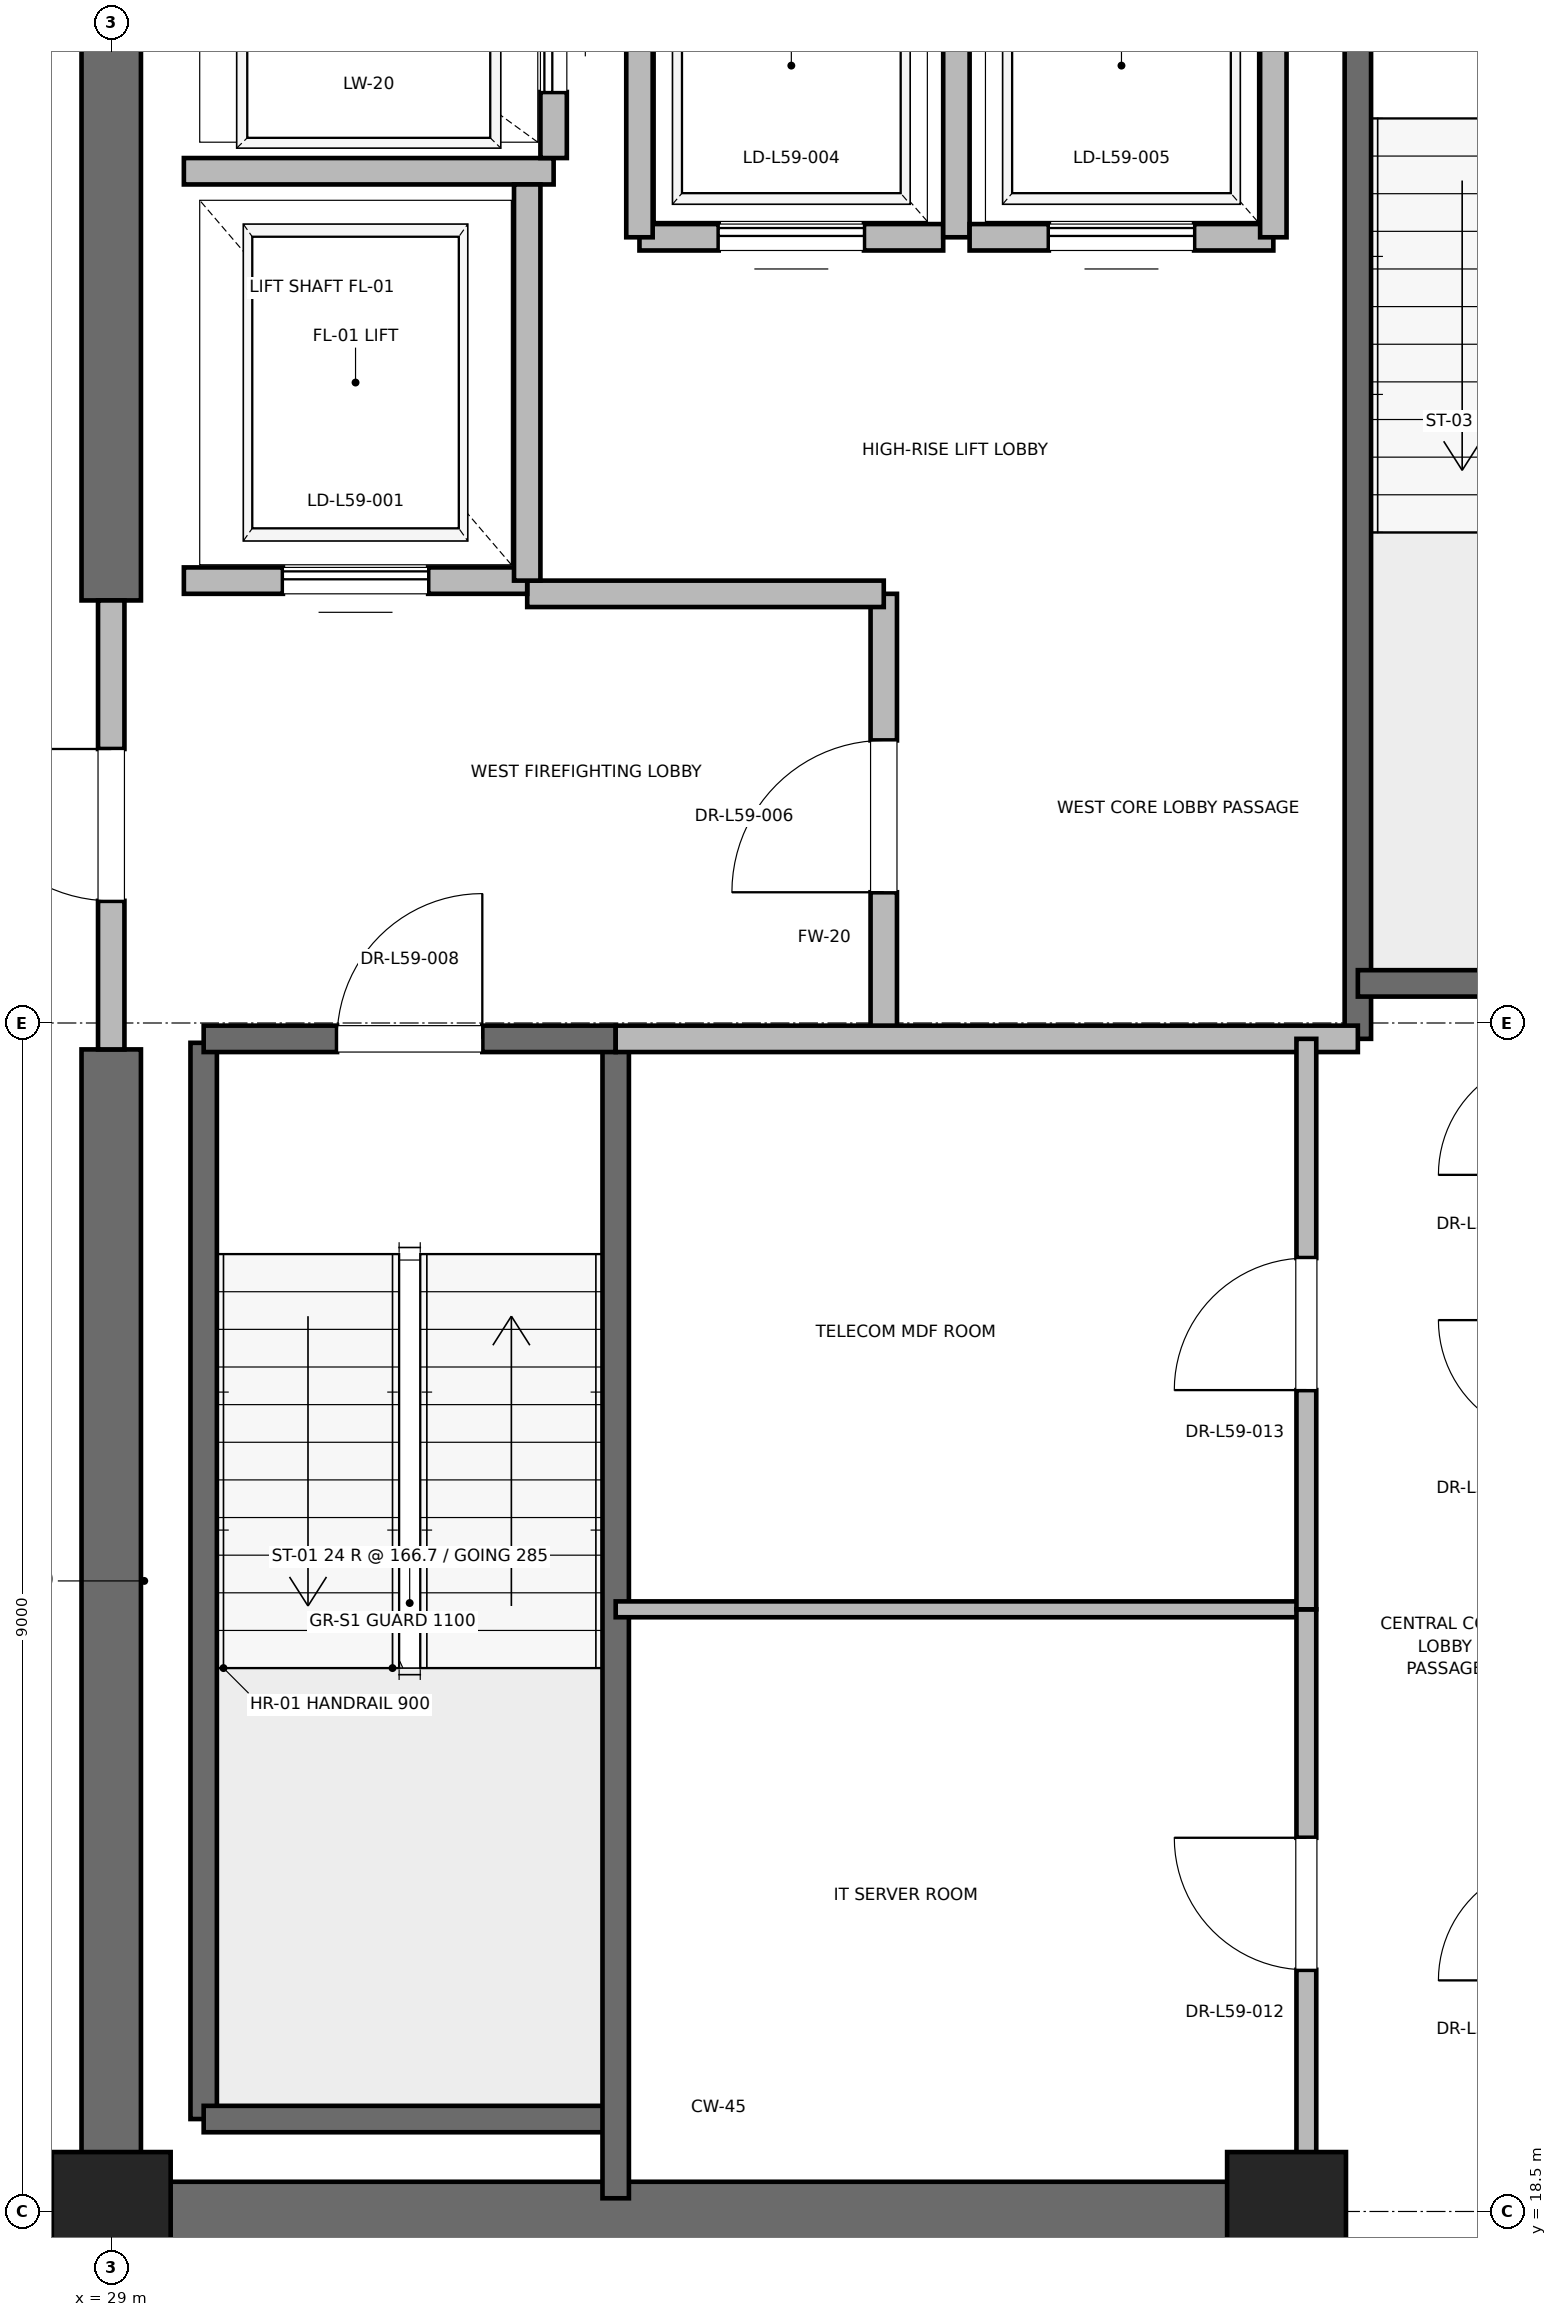
"""IFC4 building model, lengths in metres.
Left out: names, types, materials, properties, quantities, classifications, styles, units other than length and angle.
Written with IfcOpenShell. Run it as: python <this file> out.ifc"""

import sys

from ifc_helpers import new_model, si_unit, direction, frame, frame_2d, origin, origin_2d, place, context, subcontext, project, spatial, rectangle, extrude, element, fill, save


model = new_model("IFC4")
c1 = context("Model", 3, precision=1e-05, world=origin(), true_north=direction((0.0, 1.0)))
c2 = subcontext(c1, "Body", "Model", "MODEL_VIEW")
j1 = project(units=[si_unit("LENGTHUNIT", "METRE"), si_unit("PLANEANGLEUNIT", "RADIAN")], contexts=[c1])
p1 = place(None, origin())
s1 = spatial("IfcSite", under=j1, at=p1, CompositionType="ELEMENT")
p2 = place(p1, origin())
s2 = spatial("IfcBuilding", under=s1, at=p2, CompositionType="ELEMENT")
p3 = place(p2, frame((0.0, 0.0, 255.2)))
s3 = spatial("IfcBuildingStorey", under=s2, at=p3, CompositionType="ELEMENT", Elevation=255.2)
for number, where, z_axis, x_axis in (
    (1, (29.0, 18.5, 0.0), (0.0, 0.0, 1.0), (1.0, 0.0, 0.0)),
    (2, (37.9, 18.5, 0.0), (0.0, 0.0, 1.0), (1.0, 0.0, 0.0)),
):
    element("IfcColumn", number, at=place(p3, frame(where, z_axis=z_axis, x_axis=x_axis)), inside=s3, PredefinedType="PILASTER", context=c2, shape_type="SweptSolid", body=[
        extrude(rectangle(XDim=0.9, YDim=0.9, at=origin_2d()), origin(), (0.0, 0.0, 1.0), 4.0),
    ])
p4 = place(p3, frame((29.0, 18.5, 0.0), z_axis=(0.0, 0.0, 1.0), x_axis=(1.0, 0.0, 0.0)))
e3 = element("IfcWall", 3, at=p4, inside=s3, PredefinedType="SHEAR", context=c2, shape_type="SweptSolid", body=[
    extrude(rectangle(XDim=9.2, YDim=0.45, at=frame_2d((4.6, 0.0))), origin(), (0.0, 0.0, 1.0), 3.785),
])
p5 = place(p3, frame((29.0, 18.5, 0.0), z_axis=(0.0, 0.0, 1.0), x_axis=(0.0, 1.0, 0.0)))
e4 = element("IfcWall", 4, at=p5, inside=s3, PredefinedType="SHEAR", context=c2, shape_type="SweptSolid", body=[
    extrude(rectangle(XDim=8.8, YDim=0.45, at=frame_2d((4.4, 0.0))), origin(), (0.0, 0.0, 1.0), 3.785),
])
p6 = place(p3, frame((29.0, 30.7, 0.0), z_axis=(0.0, 0.0, 1.0), x_axis=(0.0, 1.0, 0.0)))
e5 = element("IfcWall", 5, at=p6, inside=s3, PredefinedType="SHEAR", context=c2, shape_type="SweptSolid", body=[
    extrude(rectangle(XDim=5.8, YDim=0.45, at=frame_2d((2.9, 0.0))), origin(), (0.0, 0.0, 1.0), 3.785),
])
p7 = place(p3, frame((29.7, 19.2, 0.0), z_axis=(0.0, 0.0, 1.0), x_axis=(0.0, 1.0, 0.0)))
e6 = element("IfcWall", 6, at=p7, inside=s3, PredefinedType="SOLIDWALL", context=c2, shape_type="SweptSolid", body=[
    extrude(rectangle(XDim=8.15, YDim=0.2, at=frame_2d((4.075, 0.0))), origin(), (0.0, 0.0, 1.0), 3.785),
])
p8 = place(p3, frame((29.7, 19.2, 0.0), z_axis=(0.0, 0.0, 1.0), x_axis=(1.0, 0.0, 0.0)))
e7 = element("IfcWall", 7, at=p8, inside=s3, PredefinedType="SOLIDWALL", context=c2, shape_type="SweptSolid", body=[
    extrude(rectangle(XDim=3.12, YDim=0.2, at=frame_2d((1.56, 0.0))), origin(), (0.0, 0.0, 1.0), 3.785),
])
p9 = place(p3, frame((32.82, 18.6, 0.0), z_axis=(0.0, 0.0, 1.0), x_axis=(0.0, 1.0, 0.0)))
e8 = element("IfcWall", 8, at=p9, inside=s3, PredefinedType="SOLIDWALL", context=c2, shape_type="SweptSolid", body=[
    extrude(rectangle(XDim=8.78, YDim=0.2, at=frame_2d((4.39, 0.0))), origin(), (0.0, 0.0, 1.0), 3.785),
])
p10 = place(p3, frame((29.7, 27.38, 0.0), z_axis=(0.0, 0.0, 1.0), x_axis=(1.0, 0.0, 0.0)))
e9 = element("IfcWall", 9, at=p10, inside=s3, PredefinedType="SOLIDWALL", context=c2, shape_type="SweptSolid", body=[
    extrude(rectangle(XDim=3.12, YDim=0.2, at=frame_2d((1.56, 0.0))), origin(), (0.0, 0.0, 1.0), 3.785),
])
p11 = place(p10, frame((1.01, 0.0, 0.0)))
e10 = element("IfcOpeningElement", 10, at=p11, cuts=e9, PredefinedType="OPENING", context=c2, shape_type="SweptSolid", body=[
    extrude(rectangle(XDim=1.1, YDim=2.15, at=frame_2d((0.55, 1.075))), frame((0.0, 0.1, 0.0), z_axis=(0.0, -1.0, 0.0), x_axis=(1.0, 0.0, 0.0)), (0.0, 0.0, 1.0), 0.2),
])
p12 = place(p3, frame((38.44, 27.38, 0.0), z_axis=(0.0, 0.0, 1.0), x_axis=(0.0, 1.0, 0.0)))
e11 = element("IfcWall", 11, at=p12, inside=s3, PredefinedType="SOLIDWALL", context=c2, shape_type="SweptSolid", body=[
    extrude(rectangle(XDim=8.87, YDim=0.2, at=frame_2d((4.435, 0.0))), origin(), (0.0, 0.0, 1.0), 3.785),
])
p13 = place(p3, frame((38.44, 27.8, 0.0), z_axis=(0.0, 0.0, 1.0), x_axis=(1.0, 0.0, 0.0)))
e12 = element("IfcWall", 12, at=p13, inside=s3, PredefinedType="SOLIDWALL", context=c2, shape_type="SweptSolid", body=[
    extrude(rectangle(XDim=3.32, YDim=0.2, at=frame_2d((1.66, 0.0))), origin(), (0.0, 0.0, 1.0), 3.785),
])
p14 = place(p3, frame((34.85, 27.38, 0.0), z_axis=(0.0, 0.0, 1.0), x_axis=(0.0, 1.0, 0.0)))
e13 = element("IfcWall", 13, at=p14, inside=s3, PredefinedType="PARTITIONING", context=c2, shape_type="SweptSolid", body=[
    extrude(rectangle(XDim=3.37, YDim=0.2, at=frame_2d((1.685, 0.0))), origin(), (0.0, 0.0, 1.0), 3.785),
])
p15 = place(p14, frame((1.11, 0.0, 0.0)))
e14 = element("IfcOpeningElement", 14, at=p15, cuts=e13, PredefinedType="OPENING", context=c2, shape_type="SweptSolid", body=[
    extrude(rectangle(XDim=1.15, YDim=2.2, at=frame_2d((0.575, 1.1))), frame((0.0, 0.1, 0.0), z_axis=(0.0, -1.0, 0.0), x_axis=(1.0, 0.0, 0.0)), (0.0, 0.0, 1.0), 0.2),
])
p16 = place(p3, frame((29.0, 27.3, 0.0), z_axis=(0.0, 0.0, 1.0), x_axis=(0.0, 1.0, 0.0)))
e15 = element("IfcWall", 15, at=p16, inside=s3, PredefinedType="PARTITIONING", context=c2, shape_type="SweptSolid", body=[
    extrude(rectangle(XDim=3.4, YDim=0.2, at=frame_2d((1.7, 0.0))), origin(), (0.0, 0.0, 1.0), 2.865),
])
p17 = place(p16, frame((1.125, 0.0, 0.0)))
e16 = element("IfcOpeningElement", 16, at=p17, cuts=e15, PredefinedType="OPENING", context=c2, shape_type="SweptSolid", body=[
    extrude(rectangle(XDim=1.15, YDim=2.2, at=frame_2d((0.575, 1.1))), frame((0.0, 0.1, 0.0), z_axis=(0.0, -1.0, 0.0), x_axis=(1.0, 0.0, 0.0)), (0.0, 0.0, 1.0), 0.2),
])
p18 = place(p3, frame((32.82, 27.38, 0.0), z_axis=(0.0, 0.0, 1.0), x_axis=(1.0, 0.0, 0.0)))
e17 = element("IfcWall", 17, at=p18, inside=s3, PredefinedType="PARTITIONING", context=c2, shape_type="SweptSolid", body=[
    extrude(rectangle(XDim=5.62, YDim=0.2, at=frame_2d((2.81, 0.0))), origin(), (0.0, 0.0, 1.0), 3.785),
])
p19 = place(p3, frame((32.15, 30.75, 0.0), z_axis=(0.0, 0.0, 1.0), x_axis=(1.0, 0.0, 0.0)))
e18 = element("IfcWall", 18, at=p19, inside=s3, PredefinedType="PARTITIONING", context=c2, shape_type="SweptSolid", body=[
    extrude(rectangle(XDim=2.7, YDim=0.2, at=frame_2d((1.35, 0.0))), origin(), (0.0, 0.0, 1.0), 3.785),
])
p20 = place(p3, frame((29.55, 30.85, 0.0), z_axis=(0.0, 0.0, 1.0), x_axis=(1.0, 0.0, 0.0)))
e19 = element("IfcWall", 19, at=p20, inside=s3, PredefinedType="SOLIDWALL", context=c2, shape_type="SweptSolid", body=[
    extrude(rectangle(XDim=2.6, YDim=0.2, at=frame_2d((1.3, 0.0))), origin(), (0.0, 0.0, 1.0), 2.865),
])
p21 = place(p20, frame((0.75, 0.0, 0.0)))
e20 = element("IfcOpeningElement", 20, at=p21, cuts=e19, PredefinedType="OPENING", context=c2, shape_type="SweptSolid", body=[
    extrude(rectangle(XDim=1.1, YDim=2.2, at=frame_2d((0.55, 1.1))), frame((0.0, 0.1, 0.0), z_axis=(0.0, -1.0, 0.0), x_axis=(1.0, 0.0, 0.0)), (0.0, 0.0, 1.0), 0.2),
])
p22 = place(p3, frame((29.55, 33.95, 0.0), z_axis=(0.0, 0.0, 1.0), x_axis=(1.0, 0.0, 0.0)))
e21 = element("IfcWall", 21, at=p22, inside=s3, PredefinedType="SOLIDWALL", context=c2, shape_type="SweptSolid", body=[
    extrude(rectangle(XDim=2.8, YDim=0.2, at=frame_2d((1.4, 0.0))), origin(), (0.0, 0.0, 1.0), 3.785),
])
p23 = place(p3, frame((32.15, 30.85, 0.0), z_axis=(0.0, 0.0, 1.0), x_axis=(0.0, 1.0, 0.0)))
e22 = element("IfcWall", 22, at=p23, inside=s3, PredefinedType="SOLIDWALL", context=c2, shape_type="SweptSolid", body=[
    extrude(rectangle(XDim=3.0, YDim=0.2, at=frame_2d((1.5, 0.0))), origin(), (0.0, 0.0, 1.0), 3.785),
])
p24 = place(p3, frame((32.35, 34.05, 0.0), z_axis=(0.0, 0.0, 1.0), x_axis=(0.0, 1.0, 0.0)))
e23 = element("IfcWall", 23, at=p24, inside=s3, PredefinedType="SOLIDWALL", context=c2, shape_type="SweptSolid", body=[
    extrude(rectangle(XDim=2.1, YDim=0.2, at=frame_2d((1.05, 0.0))), origin(), (0.0, 0.0, 1.0), 3.785),
])
p25 = place(p24, frame((0.5, 0.0, 0.0)))
e24 = element("IfcOpeningElement", 24, at=p25, cuts=e23, PredefinedType="OPENING", context=c2, shape_type="SweptSolid", body=[
    extrude(rectangle(XDim=1.1, YDim=2.2, at=frame_2d((0.55, 1.1))), frame((0.0, 0.1, 0.0), z_axis=(0.0, -1.0, 0.0), x_axis=(1.0, 0.0, 0.0)), (0.0, 0.0, 1.0), 0.2),
])
p26 = place(p3, frame((33.0, 33.45, 0.0), z_axis=(0.0, 0.0, 1.0), x_axis=(1.0, 0.0, 0.0)))
e25 = element("IfcWall", 25, at=p26, inside=s3, PredefinedType="SOLIDWALL", context=c2, shape_type="SweptSolid", body=[
    extrude(rectangle(XDim=2.3, YDim=0.2, at=frame_2d((1.15, 0.0))), origin(), (0.0, 0.0, 1.0), 3.785),
])
p27 = place(p26, frame((0.6, 0.0, 0.0)))
e26 = element("IfcOpeningElement", 26, at=p27, cuts=e25, PredefinedType="OPENING", context=c2, shape_type="SweptSolid", body=[
    extrude(rectangle(XDim=1.1, YDim=2.2, at=frame_2d((0.55, 1.1))), frame((0.0, 0.1, 0.0), z_axis=(0.0, -1.0, 0.0), x_axis=(1.0, 0.0, 0.0)), (0.0, 0.0, 1.0), 0.2),
])
p28 = place(p3, frame((33.0, 36.05, 0.0), z_axis=(0.0, 0.0, 1.0), x_axis=(0.0, -1.0, 0.0)))
e27 = element("IfcWall", 27, at=p28, inside=s3, PredefinedType="SOLIDWALL", context=c2, shape_type="SweptSolid", body=[
    extrude(rectangle(XDim=2.6, YDim=0.2, at=frame_2d((1.3, 0.0))), origin(), (0.0, 0.0, 1.0), 3.785),
])
p29 = place(p3, frame((35.4, 33.45, 0.0), z_axis=(0.0, 0.0, 1.0), x_axis=(0.0, 1.0, 0.0)))
e28 = element("IfcWall", 28, at=p29, inside=s3, PredefinedType="SOLIDWALL", context=c2, shape_type="SweptSolid", body=[
    extrude(rectangle(XDim=2.6, YDim=0.2, at=frame_2d((1.3, 0.0))), origin(), (0.0, 0.0, 1.0), 2.865),
])
p30 = place(p3, frame((35.5, 33.45, 0.0), z_axis=(0.0, 0.0, 1.0), x_axis=(1.0, 0.0, 0.0)))
e29 = element("IfcWall", 29, at=p30, inside=s3, PredefinedType="SOLIDWALL", context=c2, shape_type="SweptSolid", body=[
    extrude(rectangle(XDim=2.3, YDim=0.2, at=frame_2d((1.15, 0.0))), origin(), (0.0, 0.0, 1.0), 3.785),
])
p31 = place(p30, frame((0.6, 0.0, 0.0)))
e30 = element("IfcOpeningElement", 30, at=p31, cuts=e29, PredefinedType="OPENING", context=c2, shape_type="SweptSolid", body=[
    extrude(rectangle(XDim=1.1, YDim=2.2, at=frame_2d((0.55, 1.1))), frame((0.0, 0.1, 0.0), z_axis=(0.0, -1.0, 0.0), x_axis=(1.0, 0.0, 0.0)), (0.0, 0.0, 1.0), 0.2),
])
p32 = place(p3, frame((37.8, 33.45, 0.0), z_axis=(0.0, 0.0, 1.0), x_axis=(0.0, 1.0, 0.0)))
e31 = element("IfcWall", 31, at=p32, inside=s3, PredefinedType="SOLIDWALL", context=c2, shape_type="SweptSolid", body=[
    extrude(rectangle(XDim=2.6, YDim=0.2, at=frame_2d((1.3, 0.0))), origin(), (0.0, 0.0, 1.0), 2.865),
])
p33 = place(p3, frame((32.82, 23.06, 0.0), z_axis=(0.0, 0.0, 1.0), x_axis=(1.0, 0.0, 0.0)))
e32 = element("IfcWall", 32, at=p33, inside=s3, PredefinedType="PARTITIONING", context=c2, shape_type="SweptSolid", body=[
    extrude(rectangle(XDim=5.23, YDim=0.12, at=frame_2d((2.615, 0.0))), origin(), (0.0, 0.0, 1.0), 2.85),
])
p34 = place(p3, frame((38.05, 18.6, 0.0), z_axis=(0.0, 0.0, 1.0), x_axis=(0.0, 1.0, 0.0)))
e33 = element("IfcWall", 33, at=p34, inside=s3, PredefinedType="PARTITIONING", context=c2, shape_type="SweptSolid", body=[
    extrude(rectangle(XDim=4.46, YDim=0.15, at=frame_2d((2.23, 0.0))), origin(), (0.0, 0.0, 1.0), 2.85),
])
p35 = place(p34, frame((1.73, 0.0, 0.0)))
e34 = element("IfcOpeningElement", 34, at=p35, cuts=e33, PredefinedType="OPENING", context=c2, shape_type="SweptSolid", body=[
    extrude(rectangle(XDim=1.0, YDim=2.15, at=frame_2d((0.5, 1.075))), frame((0.0, 0.075, 0.0), z_axis=(0.0, -1.0, 0.0), x_axis=(1.0, 0.0, 0.0)), (0.0, 0.0, 1.0), 0.15),
])
p36 = place(p3, frame((38.05, 23.06, 0.0), z_axis=(0.0, 0.0, 1.0), x_axis=(0.0, 1.0, 0.0)))
e35 = element("IfcWall", 35, at=p36, inside=s3, PredefinedType="PARTITIONING", context=c2, shape_type="SweptSolid", body=[
    extrude(rectangle(XDim=4.32, YDim=0.15, at=frame_2d((2.16, 0.0))), origin(), (0.0, 0.0, 1.0), 2.85),
])
p37 = place(p36, frame((1.66, 0.0, 0.0)))
e36 = element("IfcOpeningElement", 36, at=p37, cuts=e35, PredefinedType="OPENING", context=c2, shape_type="SweptSolid", body=[
    extrude(rectangle(XDim=1.0, YDim=2.15, at=frame_2d((0.5, 1.075))), frame((0.0, 0.075, 0.0), z_axis=(0.0, -1.0, 0.0), x_axis=(1.0, 0.0, 0.0)), (0.0, 0.0, 1.0), 0.15),
])
p38 = place(p11, origin())
e37 = element("IfcDoor", 37, at=p38, inside=s3, OperationType="SINGLE_SWING_RIGHT", PredefinedType="DOOR", context=c2, shape_type="SweptSolid", body=[
    extrude(rectangle(XDim=1.1, YDim=2.15, at=frame_2d((0.55, 1.075))), frame((0.0, 0.025, 0.0), z_axis=(0.0, -1.0, 0.0), x_axis=(1.0, 0.0, 0.0)), (0.0, 0.0, 1.0), 0.05),
])
fill(e10, e37)
p39 = place(p15, origin())
e38 = element("IfcDoor", 38, at=p39, inside=s3, OperationType="SINGLE_SWING_LEFT", PredefinedType="DOOR", context=c2, shape_type="SweptSolid", body=[
    extrude(rectangle(XDim=1.15, YDim=2.2, at=frame_2d((0.575, 1.1))), frame((0.0, 0.025, 0.0), z_axis=(0.0, -1.0, 0.0), x_axis=(1.0, 0.0, 0.0)), (0.0, 0.0, 1.0), 0.05),
])
fill(e14, e38)
p40 = place(p17, origin())
e39 = element("IfcDoor", 39, at=p40, inside=s3, OperationType="SINGLE_SWING_RIGHT", PredefinedType="DOOR", context=c2, shape_type="SweptSolid", body=[
    extrude(rectangle(XDim=1.15, YDim=2.2, at=frame_2d((0.575, 1.1))), frame((0.0, 0.025, 0.0), z_axis=(0.0, -1.0, 0.0), x_axis=(1.0, 0.0, 0.0)), (0.0, 0.0, 1.0), 0.05),
])
fill(e16, e39)
p41 = place(p21, origin())
e40 = element("IfcDoor", 40, at=p41, inside=s3, OperationType="SLIDING_TO_RIGHT", PredefinedType="DOOR", context=c2, shape_type="SweptSolid", body=[
    extrude(rectangle(XDim=1.1, YDim=2.2, at=frame_2d((0.55, 1.1))), frame((0.0, 0.025, 0.0), z_axis=(0.0, -1.0, 0.0), x_axis=(1.0, 0.0, 0.0)), (0.0, 0.0, 1.0), 0.05),
])
fill(e20, e40)
p42 = place(p25, origin())
e41 = element("IfcDoor", 41, at=p42, inside=s3, OperationType="SLIDING_TO_RIGHT", PredefinedType="DOOR", context=c2, shape_type="SweptSolid", body=[
    extrude(rectangle(XDim=1.1, YDim=2.2, at=frame_2d((0.55, 1.1))), frame((0.0, 0.025, 0.0), z_axis=(0.0, -1.0, 0.0), x_axis=(1.0, 0.0, 0.0)), (0.0, 0.0, 1.0), 0.05),
])
fill(e24, e41)
p43 = place(p27, origin())
e42 = element("IfcDoor", 42, at=p43, inside=s3, OperationType="SLIDING_TO_RIGHT", PredefinedType="DOOR", context=c2, shape_type="SweptSolid", body=[
    extrude(rectangle(XDim=1.1, YDim=2.2, at=frame_2d((0.55, 1.1))), frame((0.0, 0.025, 0.0), z_axis=(0.0, -1.0, 0.0), x_axis=(1.0, 0.0, 0.0)), (0.0, 0.0, 1.0), 0.05),
])
fill(e26, e42)
p44 = place(p31, origin())
e43 = element("IfcDoor", 43, at=p44, inside=s3, OperationType="SLIDING_TO_RIGHT", PredefinedType="DOOR", context=c2, shape_type="SweptSolid", body=[
    extrude(rectangle(XDim=1.1, YDim=2.2, at=frame_2d((0.55, 1.1))), frame((0.0, 0.025, 0.0), z_axis=(0.0, -1.0, 0.0), x_axis=(1.0, 0.0, 0.0)), (0.0, 0.0, 1.0), 0.05),
])
fill(e30, e43)
p45 = place(p35, origin())
e44 = element("IfcDoor", 44, at=p45, inside=s3, OperationType="SINGLE_SWING_RIGHT", PredefinedType="DOOR", context=c2, shape_type="SweptSolid", body=[
    extrude(rectangle(XDim=1.0, YDim=2.15, at=frame_2d((0.5, 1.075))), frame((0.0, 0.025, 0.0), z_axis=(0.0, -1.0, 0.0), x_axis=(1.0, 0.0, 0.0)), (0.0, 0.0, 1.0), 0.05),
])
fill(e34, e44)
p46 = place(p37, origin())
e45 = element("IfcDoor", 45, at=p46, inside=s3, OperationType="SINGLE_SWING_LEFT", PredefinedType="DOOR", context=c2, shape_type="SweptSolid", body=[
    extrude(rectangle(XDim=1.0, YDim=2.15, at=frame_2d((0.5, 1.075))), frame((0.0, 0.025, 0.0), z_axis=(0.0, -1.0, 0.0), x_axis=(1.0, 0.0, 0.0)), (0.0, 0.0, 1.0), 0.05),
])
fill(e36, e45)
save(model, sys.argv[1])
